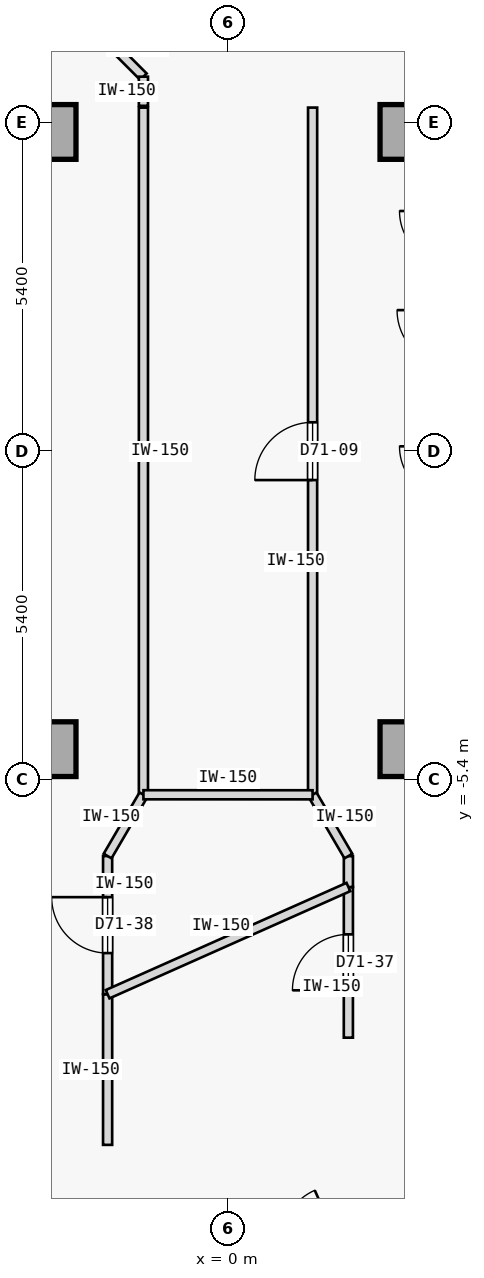
"""IFC4 building model, lengths in metres.
Left out: names, types, materials, properties, quantities, classifications, styles, units other than length and angle.
Written with IfcOpenShell. Run it as: python <this file> out.ifc"""

import sys

from ifc_helpers import new_model, si_unit, direction, frame, frame_2d, origin, origin_2d, place, context, subcontext, project, spatial, rectangle, extrude, element, fill, save


model = new_model("IFC4")
c1 = context("Model", 3, precision=1e-05, world=origin(), true_north=direction((0.0, 1.0)))
c2 = subcontext(c1, "Body", "Model", "MODEL_VIEW")
j1 = project(units=[si_unit("LENGTHUNIT", "METRE"), si_unit("PLANEANGLEUNIT", "RADIAN")], contexts=[c1])
p1 = place(None, origin())
s1 = spatial("IfcSite", under=j1, at=p1, CompositionType="ELEMENT")
p2 = place(p1, origin())
s2 = spatial("IfcBuilding", under=s1, at=p2, CompositionType="ELEMENT")
p3 = place(p2, frame((0.0, 0.0, 265.55)))
s3 = spatial("IfcBuildingStorey", under=s2, at=p3, CompositionType="ELEMENT", Elevation=265.55)
for number, where, z_axis, x_axis in (
    (1, (-2.95, -4.9, 0.0), (0.0, 0.0, 1.0), (1.0, 0.0, 0.0)),
    (2, (-2.95, 5.25, 0.0), (0.0, 0.0, 1.0), (1.0, 0.0, 0.0)),
    (3, (2.95, -4.9, 0.0), (0.0, 0.0, 1.0), (1.0, 0.0, 0.0)),
    (4, (2.95, 5.25, 0.0), (0.0, 0.0, 1.0), (1.0, 0.0, 0.0)),
):
    element("IfcColumn", number, at=place(p3, frame(where, z_axis=z_axis, x_axis=x_axis)), inside=s3, PredefinedType="COLUMN", context=c2, shape_type="SweptSolid", body=[
        extrude(rectangle(XDim=0.9, YDim=0.9, at=origin_2d()), origin(), (0.0, 0.0, 1.0), 3.35),
    ])
p4 = place(p3, frame((-1.391, -5.65, 0.0), z_axis=(0.0, 0.0, 1.0), x_axis=(-2.1605738e-05, 0.999999999767, 0.0)))
e5 = element("IfcWall", 5, at=p4, inside=s3, PredefinedType="PARTITIONING", context=c2, shape_type="SweptSolid", body=[
    extrude(rectangle(XDim=11.3, YDim=0.15, at=frame_2d((5.65, 0.0))), origin(), (0.0, 0.0, 1.0), 3.125),
])
p5 = place(p3, frame((1.391, -5.65, 0.0), z_axis=(0.0, 0.0, 1.0), x_axis=(4.3206809e-05, 0.999999999067, 0.0)))
e6 = element("IfcWall", 6, at=p5, inside=s3, PredefinedType="PARTITIONING", context=c2, shape_type="SweptSolid", body=[
    extrude(rectangle(XDim=11.301, YDim=0.15, at=frame_2d((5.65, 0.0))), origin(), (0.0, 0.0, 1.0), 3.125),
])
p6 = place(p5, frame((5.176, 0.0, 0.0)))
e7 = element("IfcOpeningElement", 7, at=p6, cuts=e6, PredefinedType="OPENING", context=c2, shape_type="SweptSolid", body=[
    extrude(rectangle(XDim=0.95, YDim=2.15, at=frame_2d((0.475, 1.075))), frame((0.0, 0.085, 0.0), z_axis=(0.0, -1.0, 0.0), x_axis=(1.0, 0.0, 0.0)), (0.0, 0.0, 1.0), 0.17),
])
p7 = place(p3, frame((-4.445, -15.808, 0.0), z_axis=(0.0, 0.0, 1.0), x_axis=(0.913546853922, 0.406733506966, 0.0)))
e8 = element("IfcWall", 8, at=p7, inside=s3, PredefinedType="PARTITIONING", context=c2, shape_type="SweptSolid", body=[
    extrude(rectangle(XDim=12.751, YDim=0.15, at=frame_2d((6.375, 0.0))), origin(), (0.0, 0.0, 1.0), 3.125),
])
p8 = place(p7, frame((5.9, 0.0, 0.0)))
e9 = element("IfcOpeningElement", 9, at=p8, cuts=e8, PredefinedType="OPENING", context=c2, shape_type="SweptSolid", body=[
    extrude(rectangle(XDim=0.95, YDim=2.15, at=frame_2d((0.475, 1.075))), frame((0.0, 0.085, 0.0), z_axis=(0.0, -1.0, 0.0), x_axis=(1.0, 0.0, 0.0)), (0.0, 0.0, 1.0), 0.17),
])
p9 = place(p3, frame((-1.98, -11.407, 0.0), z_axis=(0.0, 0.0, 1.0), x_axis=(9.8551295e-05, 0.999999995144, 0.0)))
e10 = element("IfcWall", 10, at=p9, inside=s3, PredefinedType="PARTITIONING", context=c2, shape_type="SweptSolid", body=[
    extrude(rectangle(XDim=2.477, YDim=0.15, at=frame_2d((1.239, 0.0))), origin(), (0.0, 0.0, 1.0), 3.125),
])
p10 = place(p3, frame((1.979, -9.645, 0.0), z_axis=(0.0, 0.0, 1.0), x_axis=(9.8541584e-05, 0.999999995145, 0.0)))
e11 = element("IfcWall", 11, at=p10, inside=s3, PredefinedType="PARTITIONING", context=c2, shape_type="SweptSolid", body=[
    extrude(rectangle(XDim=2.478, YDim=0.15, at=frame_2d((1.239, 0.0))), origin(), (0.0, 0.0, 1.0), 3.125),
])
p11 = place(p10, frame((0.779, 0.0, 0.0)))
e12 = element("IfcOpeningElement", 12, at=p11, cuts=e11, PredefinedType="OPENING", context=c2, shape_type="SweptSolid", body=[
    extrude(rectangle(XDim=0.92, YDim=2.15, at=frame_2d((0.46, 1.075))), frame((0.0, 0.085, 0.0), z_axis=(0.0, -1.0, 0.0), x_axis=(1.0, 0.0, 0.0)), (0.0, 0.0, 1.0), 0.17),
])
p12 = place(p3, frame((-1.98, -8.93, 0.0), z_axis=(0.0, 0.0, 1.0), x_axis=(-0.000107446008, 0.999999994228, 0.0)))
e13 = element("IfcWall", 13, at=p12, inside=s3, PredefinedType="PARTITIONING", context=c2, shape_type="SweptSolid", body=[
    extrude(rectangle(XDim=2.272, YDim=0.15, at=frame_2d((1.136, 0.0))), origin(), (0.0, 0.0, 1.0), 3.125),
])
p13 = place(p12, frame((0.676, 0.0, 0.0)))
e14 = element("IfcOpeningElement", 14, at=p13, cuts=e13, PredefinedType="OPENING", context=c2, shape_type="SweptSolid", body=[
    extrude(rectangle(XDim=0.92, YDim=2.15, at=frame_2d((0.46, 1.075))), frame((0.0, 0.085, 0.0), z_axis=(0.0, -1.0, 0.0), x_axis=(1.0, 0.0, 0.0)), (0.0, 0.0, 1.0), 0.17),
])
p14 = place(p3, frame((-1.98, -6.658, 0.0), z_axis=(0.0, 0.0, 1.0), x_axis=(0.504651025514, 0.863323428645, 0.0)))
e15 = element("IfcWall", 15, at=p14, inside=s3, PredefinedType="PARTITIONING", context=c2, shape_type="SweptSolid", body=[
    extrude(rectangle(XDim=1.167, YDim=0.15, at=frame_2d((0.584, 0.0))), origin(), (0.0, 0.0, 1.0), 3.125),
])
p15 = place(p3, frame((1.979, -7.167, 0.0), z_axis=(0.0, 0.0, 1.0), x_axis=(0.000961075962, 0.999999538166, 0.0)))
e16 = element("IfcWall", 16, at=p15, inside=s3, PredefinedType="PARTITIONING", context=c2, shape_type="SweptSolid", body=[
    extrude(rectangle(XDim=0.508, YDim=0.15, at=frame_2d((0.254, 0.0))), origin(), (0.0, 0.0, 1.0), 3.125),
])
p16 = place(p3, frame((1.391, -5.65, 0.0), z_axis=(0.0, 0.0, 1.0), x_axis=(0.504339173621, -0.863505644424, 0.0)))
e17 = element("IfcWall", 17, at=p16, inside=s3, PredefinedType="PARTITIONING", context=c2, shape_type="SweptSolid", body=[
    extrude(rectangle(XDim=1.167, YDim=0.15, at=frame_2d((0.583, 0.0))), origin(), (0.0, 0.0, 1.0), 3.125),
])
p17 = place(p3, frame((-1.98, 6.749, 0.0), z_axis=(0.0, 0.0, 1.0), x_axis=(0.706520457458, -0.707692619146, 0.0)))
e18 = element("IfcWall", 18, at=p17, inside=s3, PredefinedType="PARTITIONING", context=c2, shape_type="SweptSolid", body=[
    extrude(rectangle(XDim=0.833, YDim=0.15, at=frame_2d((0.417, 0.0))), origin(), (0.0, 0.0, 1.0), 3.125),
])
p18 = place(p3, frame((-1.391, 5.68, 0.0), z_axis=(0.0, 0.0, 1.0), x_axis=(0.0, 1.0, 0.0)))
e19 = element("IfcWall", 19, at=p18, inside=s3, PredefinedType="PARTITIONING", context=c2, shape_type="SweptSolid", body=[
    extrude(rectangle(XDim=0.479, YDim=0.15, at=frame_2d((0.24, 0.0))), origin(), (0.0, 0.0, 1.0), 3.125),
])
p19 = place(p3, frame((-1.391, -5.65, 0.0), z_axis=(0.0, 0.0, 1.0), x_axis=(0.999999984594, -0.000175530979, 0.0)))
e20 = element("IfcWall", 20, at=p19, inside=s3, PredefinedType="PARTITIONING", context=c2, shape_type="SweptSolid", body=[
    extrude(rectangle(XDim=2.782, YDim=0.15, at=frame_2d((1.391, 0.0))), origin(), (0.0, 0.0, 1.0), 3.125),
])
p20 = place(p3, frame((-1.98, -8.93, 0.0), z_axis=(0.0, 0.0, 1.0), x_axis=(0.913530252303, 0.406770793111, 0.0)))
e21 = element("IfcWall", 21, at=p20, inside=s3, PredefinedType="PARTITIONING", context=c2, shape_type="SweptSolid", body=[
    extrude(rectangle(XDim=4.334, YDim=0.15, at=frame_2d((2.167, 0.0))), origin(), (0.0, 0.0, 1.0), 3.125),
])
p21 = place(p6, origin())
e22 = element("IfcDoor", 22, at=p21, inside=s3, OperationType="SINGLE_SWING_LEFT", PredefinedType="DOOR", context=c2, shape_type="SweptSolid", body=[
    extrude(rectangle(XDim=0.95, YDim=2.15, at=frame_2d((0.475, 1.075))), frame((0.0, 0.025, 0.0), z_axis=(0.0, -1.0, 0.0), x_axis=(1.0, 0.0, 0.0)), (0.0, 0.0, 1.0), 0.05),
])
fill(e7, e22)
p22 = place(p11, origin())
e23 = element("IfcDoor", 23, at=p22, inside=s3, OperationType="SINGLE_SWING_LEFT", PredefinedType="DOOR", context=c2, shape_type="SweptSolid", body=[
    extrude(rectangle(XDim=0.92, YDim=2.15, at=frame_2d((0.46, 1.075))), frame((0.0, 0.025, 0.0), z_axis=(0.0, -1.0, 0.0), x_axis=(1.0, 0.0, 0.0)), (0.0, 0.0, 1.0), 0.05),
])
fill(e12, e23)
p23 = place(p13, origin())
e24 = element("IfcDoor", 24, at=p23, inside=s3, OperationType="SINGLE_SWING_RIGHT", PredefinedType="DOOR", context=c2, shape_type="SweptSolid", body=[
    extrude(rectangle(XDim=0.92, YDim=2.15, at=frame_2d((0.46, 1.075))), frame((0.0, 0.025, 0.0), z_axis=(0.0, -1.0, 0.0), x_axis=(1.0, 0.0, 0.0)), (0.0, 0.0, 1.0), 0.05),
])
fill(e14, e24)
save(model, sys.argv[1])
